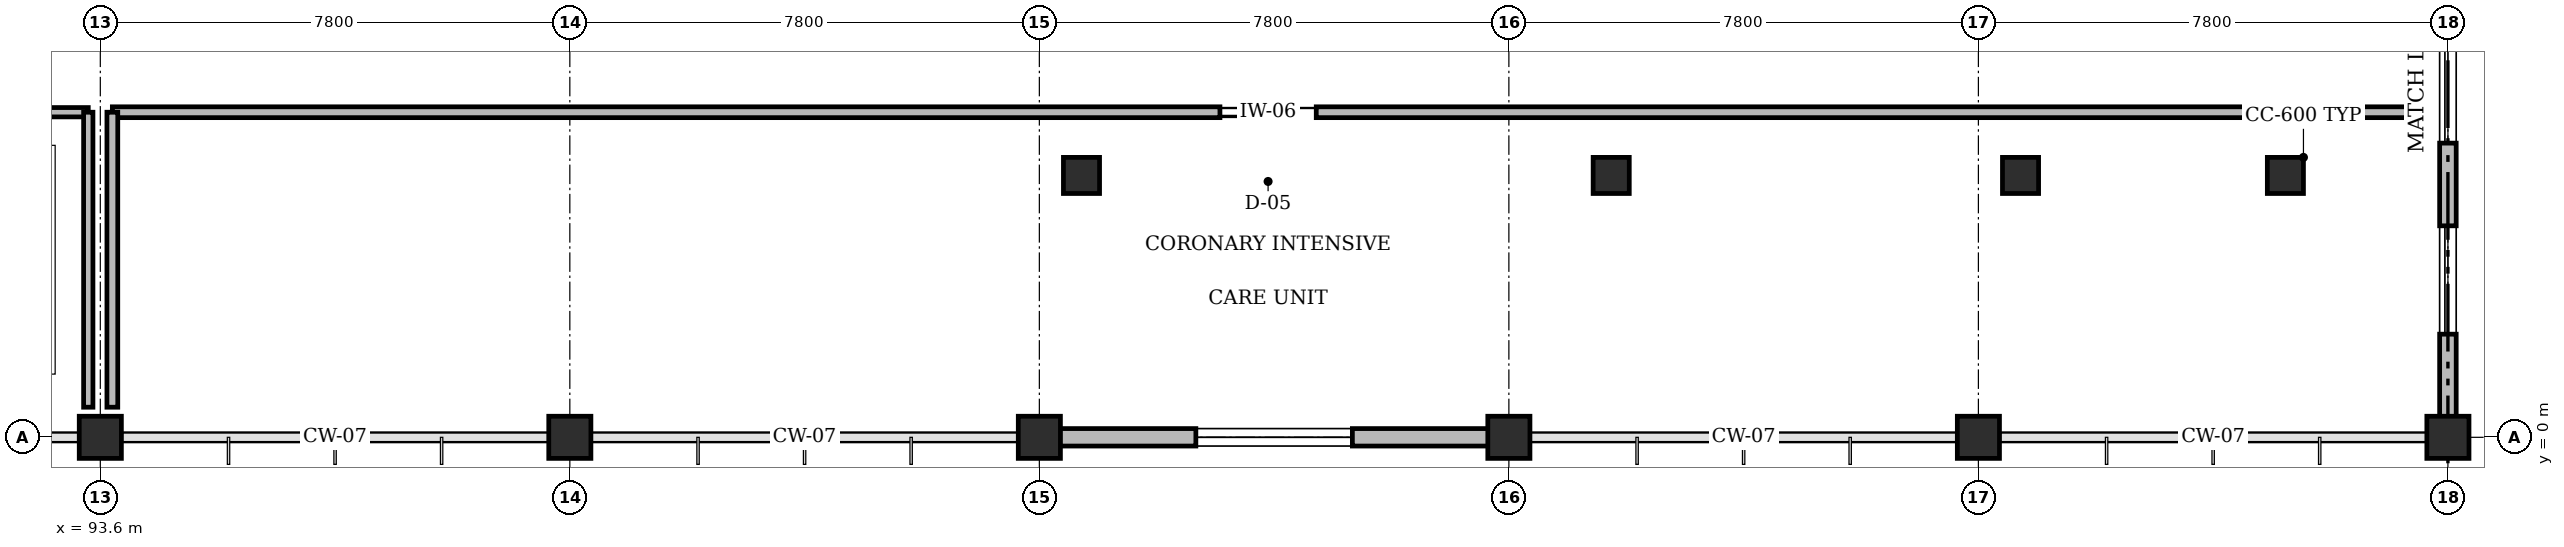
"""IFC4 building model, lengths in metres.
Left out: names, types, materials, properties, quantities, classifications, styles, units other than length and angle.
Written with IfcOpenShell. Run it as: python <this file> out.ifc"""

import sys

from ifc_helpers import new_model, si_unit, direction, frame, frame_2d, origin, origin_2d, place, context, subcontext, project, spatial, rectangle, circle, extrude, element, fill, save


model = new_model("IFC4")
c1 = context("Model", 3, precision=1e-05, world=origin(), true_north=direction((0.0, 1.0)))
c2 = subcontext(c1, "Body", "Model", "MODEL_VIEW")
j1 = project(units=[si_unit("LENGTHUNIT", "METRE"), si_unit("PLANEANGLEUNIT", "RADIAN")], contexts=[c1])
p1 = place(None, origin())
s1 = spatial("IfcSite", under=j1, at=p1, CompositionType="ELEMENT")
p2 = place(p1, origin())
s2 = spatial("IfcBuilding", under=s1, at=p2, CompositionType="ELEMENT")
p3 = place(p2, frame((0.0, 0.0, 4.8)))
s3 = spatial("IfcBuildingStorey", under=s2, at=p3, CompositionType="ELEMENT", Elevation=4.8)
for number, where, z_axis, x_axis in (
    (1, (93.6, 0.0, 0.0), (0.0, 0.0, 1.0), (1.0, 0.0, 0.0)),
    (2, (101.4, 0.0, 0.0), (0.0, 0.0, 1.0), (1.0, 0.0, 0.0)),
    (3, (109.2, 0.0, 0.0), (0.0, 0.0, 1.0), (1.0, 0.0, 0.0)),
    (4, (117.0, 0.0, 0.0), (0.0, 0.0, 1.0), (1.0, 0.0, 0.0)),
    (5, (124.8, 0.0, 0.0), (0.0, 0.0, 1.0), (1.0, 0.0, 0.0)),
    (6, (132.6, 0.0, 0.0), (0.0, 0.0, 1.0), (1.0, 0.0, 0.0)),
):
    element("IfcColumn", number, at=place(p3, frame(where, z_axis=z_axis, x_axis=x_axis)), inside=s3, PredefinedType="PILASTER", context=c2, shape_type="SweptSolid", body=[
        extrude(circle(Radius=0.35, at=origin_2d()), origin(), (0.0, 0.0, 1.0), 4.8),
    ])
for number, where, z_axis, x_axis in (
    (7, (129.9, 4.35, 0.0), (0.0, 0.0, 1.0), (1.0, 0.0, 0.0)),
    (8, (125.5, 4.35, 0.0), (0.0, 0.0, 1.0), (1.0, 0.0, 0.0)),
    (9, (118.7, 4.35, 0.0), (0.0, 0.0, 1.0), (1.0, 0.0, 0.0)),
    (10, (109.9, 4.35, 0.0), (0.0, 0.0, 1.0), (1.0, 0.0, 0.0)),
):
    element("IfcColumn", number, at=place(p3, frame(where, z_axis=z_axis, x_axis=x_axis)), inside=s3, PredefinedType="PILASTER", context=c2, shape_type="SweptSolid", body=[
        extrude(circle(Radius=0.3, at=origin_2d()), origin(), (0.0, 0.0, 1.0), 4.8),
    ])
p4 = place(p3, frame((116.66, 0.0, 0.0), z_axis=(0.0, 0.0, 1.0), x_axis=(-1.0, 0.0, 0.0)))
e11 = element("IfcWall", 11, at=p4, inside=s3, PredefinedType="STANDARD", context=c2, shape_type="SweptSolid", body=[
    extrude(rectangle(XDim=7.12, YDim=0.29, at=frame_2d((3.56, 0.0))), origin(), (0.0, 0.0, 1.0), 3.68),
])
p5 = place(p4, frame((2.26, 0.0, 0.9)))
e12 = element("IfcOpeningElement", 12, at=p5, cuts=e11, PredefinedType="OPENING", context=c2, shape_type="SweptSolid", body=[
    extrude(rectangle(XDim=2.6, YDim=1.65, at=frame_2d((1.3, 0.825))), frame((0.0, 0.155, 0.0), z_axis=(0.0, -1.0, 0.0), x_axis=(1.0, 0.0, 0.0)), (0.0, 0.0, 1.0), 0.31),
])
p6 = place(p3, frame((132.6, 8.06, 0.0), z_axis=(0.0, 0.0, 1.0), x_axis=(0.0, -1.0, 0.0)))
e13 = element("IfcWall", 13, at=p6, inside=s3, PredefinedType="STANDARD", context=c2, shape_type="SweptSolid", body=[
    extrude(rectangle(XDim=7.72, YDim=0.275, at=frame_2d((3.86, 0.0))), origin(), (0.0, 0.0, 1.0), 3.665),
])
p7 = place(p6, frame((1.373, 0.0, 0.9)))
e14 = element("IfcOpeningElement", 14, at=p7, cuts=e13, PredefinedType="OPENING", context=c2, shape_type="SweptSolid", body=[
    extrude(rectangle(XDim=1.8, YDim=1.65, at=frame_2d((0.9, 0.825))), frame((0.0, 0.147, 0.0), z_axis=(0.0, -1.0, 0.0), x_axis=(1.0, 0.0, 0.0)), (0.0, 0.0, 1.0), 0.295),
])
p8 = place(p6, frame((4.547, 0.0, 0.9)))
e15 = element("IfcOpeningElement", 15, at=p8, cuts=e13, PredefinedType="OPENING", context=c2, shape_type="SweptSolid", body=[
    extrude(rectangle(XDim=1.8, YDim=1.65, at=frame_2d((0.9, 0.825))), frame((0.0, 0.147, 0.0), z_axis=(0.0, -1.0, 0.0), x_axis=(1.0, 0.0, 0.0)), (0.0, 0.0, 1.0), 0.295),
])
p9 = place(p3, frame((46.8, 5.4, 0.0), z_axis=(0.0, 0.0, 1.0), x_axis=(1.0, 0.0, 0.0)))
e16 = element("IfcWall", 16, at=p9, inside=s3, PredefinedType="PARTITIONING", context=c2, shape_type="SweptSolid", body=[
    extrude(rectangle(XDim=46.6, YDim=0.155, at=frame_2d((23.3, 0.0))), origin(), (0.0, 0.0, 1.0), 4.46),
])
p10 = place(p9, frame((22.6, 0.0, 0.0)))
e17 = element("IfcOpeningElement", 17, at=p10, cuts=e16, PredefinedType="OPENING", context=c2, shape_type="SweptSolid", body=[
    extrude(rectangle(XDim=1.4, YDim=2.2, at=frame_2d((0.7, 1.1))), frame((0.0, 0.087, 0.0), z_axis=(0.0, -1.0, 0.0), x_axis=(1.0, 0.0, 0.0)), (0.0, 0.0, 1.0), 0.175),
])
p11 = place(p3, frame((93.4, 0.5, 0.0), z_axis=(0.0, 0.0, 1.0), x_axis=(0.0, 1.0, 0.0)))
e18 = element("IfcWall", 18, at=p11, inside=s3, PredefinedType="PARTITIONING", context=c2, shape_type="SweptSolid", body=[
    extrude(rectangle(XDim=4.9, YDim=0.155, at=frame_2d((2.45, 0.0))), origin(), (0.0, 0.0, 1.0), 3.665),
])
p12 = place(p3, frame((93.8, 5.4, 0.0), z_axis=(0.0, 0.0, 1.0), x_axis=(1.0, 0.0, 0.0)))
e19 = element("IfcWall", 19, at=p12, inside=s3, PredefinedType="PARTITIONING", context=c2, shape_type="SweptSolid", body=[
    extrude(rectangle(XDim=38.4, YDim=0.18, at=frame_2d((19.2, 0.0))), origin(), (0.0, 0.0, 1.0), 4.46),
])
p13 = place(p12, frame((18.4, 0.0, 0.0)))
e20 = element("IfcOpeningElement", 20, at=p13, cuts=e19, PredefinedType="OPENING", context=c2, shape_type="SweptSolid", body=[
    extrude(rectangle(XDim=1.6, YDim=2.25, at=frame_2d((0.8, 1.125))), frame((0.0, 0.1, 0.0), z_axis=(0.0, -1.0, 0.0), x_axis=(1.0, 0.0, 0.0)), (0.0, 0.0, 1.0), 0.2),
])
p14 = place(p3, frame((93.8, 0.5, 0.0), z_axis=(0.0, 0.0, 1.0), x_axis=(0.0, 1.0, 0.0)))
e21 = element("IfcWall", 21, at=p14, inside=s3, PredefinedType="PARTITIONING", context=c2, shape_type="SweptSolid", body=[
    extrude(rectangle(XDim=4.9, YDim=0.18, at=frame_2d((2.45, 0.0))), origin(), (0.0, 0.0, 1.0), 3.665),
])
p15 = place(p5, origin())
e22 = element("IfcWindow", 22, at=p15, inside=s3, PartitioningType="SINGLE_PANEL", PredefinedType="WINDOW", context=c2, shape_type="SweptSolid", body=[
    extrude(rectangle(XDim=2.6, YDim=1.65, at=frame_2d((1.3, 0.825))), frame((0.0, 0.03, 0.0), z_axis=(0.0, -1.0, 0.0), x_axis=(1.0, 0.0, 0.0)), (0.0, 0.0, 1.0), 0.06),
])
fill(e12, e22)
p16 = place(p7, origin())
e23 = element("IfcWindow", 23, at=p16, inside=s3, PartitioningType="SINGLE_PANEL", PredefinedType="WINDOW", context=c2, shape_type="SweptSolid", body=[
    extrude(rectangle(XDim=1.8, YDim=1.65, at=frame_2d((0.9, 0.825))), frame((0.0, 0.03, 0.0), z_axis=(0.0, -1.0, 0.0), x_axis=(1.0, 0.0, 0.0)), (0.0, 0.0, 1.0), 0.06),
])
fill(e14, e23)
p17 = place(p8, origin())
e24 = element("IfcWindow", 24, at=p17, inside=s3, PartitioningType="SINGLE_PANEL", PredefinedType="WINDOW", context=c2, shape_type="SweptSolid", body=[
    extrude(rectangle(XDim=1.8, YDim=1.65, at=frame_2d((0.9, 0.825))), frame((0.0, 0.03, 0.0), z_axis=(0.0, -1.0, 0.0), x_axis=(1.0, 0.0, 0.0)), (0.0, 0.0, 1.0), 0.06),
])
fill(e15, e24)
p18 = place(p13, origin())
e25 = element("IfcDoor", 25, at=p18, inside=s3, OperationType="SLIDING_TO_RIGHT", PredefinedType="DOOR", context=c2, shape_type="SweptSolid", body=[
    extrude(rectangle(XDim=1.6, YDim=2.25, at=frame_2d((0.8, 1.125))), frame((0.0, 0.025, 0.0), z_axis=(0.0, -1.0, 0.0), x_axis=(1.0, 0.0, 0.0)), (0.0, 0.0, 1.0), 0.05),
])
fill(e20, e25)
save(model, sys.argv[1])
